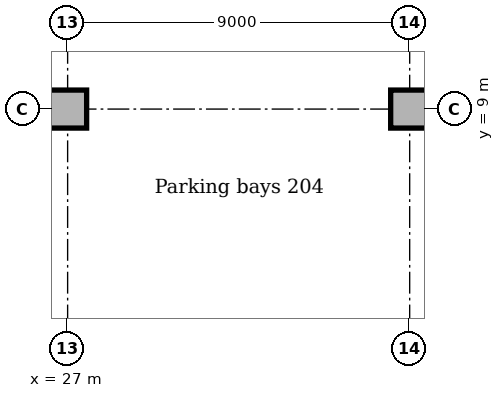
"""IFC4 building model, lengths in metres.
Left out: names, types, materials, properties, quantities, classifications, styles, units other than length and angle.
Written with IfcOpenShell. Run it as: python <this file> out.ifc"""

import sys

from ifc_helpers import new_model, si_unit, direction, frame, origin, origin_2d, place, context, subcontext, project, spatial, rectangle, extrude, element, save


model = new_model("IFC4")
c1 = context("Model", 3, precision=1e-05, world=origin(), true_north=direction((0.0, 1.0)))
c2 = subcontext(c1, "Body", "Model", "MODEL_VIEW")
j1 = project(units=[si_unit("LENGTHUNIT", "METRE"), si_unit("PLANEANGLEUNIT", "RADIAN")], contexts=[c1])
p1 = place(None, origin())
s1 = spatial("IfcSite", under=j1, at=p1, CompositionType="ELEMENT")
p2 = place(p1, origin())
s2 = spatial("IfcBuilding", under=s1, at=p2, CompositionType="ELEMENT")
p3 = place(p2, frame((0.0, 0.0, -9.5)))
s3 = spatial("IfcBuildingStorey", under=s2, at=p3, CompositionType="ELEMENT", Elevation=-9.5)
for number, where, z_axis, x_axis in (
    (1, (27.0, 9.0, 0.0), (0.0, 0.0, 1.0), (1.0, 0.0, 0.0)),
    (2, (36.0, 9.0, 0.0), (0.0, 0.0, 1.0), (1.0, 0.0, 0.0)),
):
    element("IfcColumn", number, at=place(p3, frame(where, z_axis=z_axis, x_axis=x_axis)), inside=s3, PredefinedType="COLUMN", context=c2, shape_type="SweptSolid", body=[
        extrude(rectangle(XDim=1.0, YDim=1.0, at=origin_2d()), origin(), (0.0, 0.0, 1.0), 4.15),
    ])
save(model, sys.argv[1])
